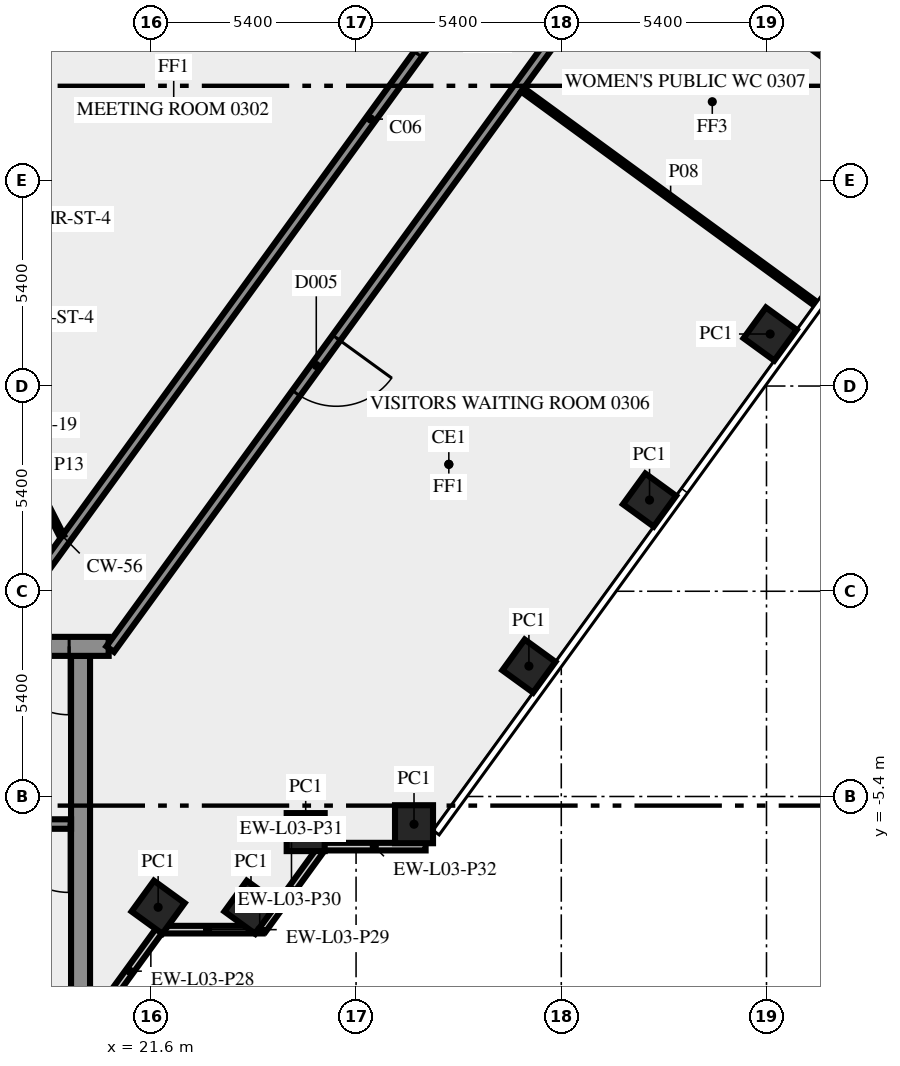
"""IFC4 building model, lengths in metres.
Left out: names, types, materials, properties, quantities, classifications, styles, units other than length and angle.
Written with IfcOpenShell. Run it as: python <this file> out.ifc"""

import sys

from ifc_helpers import new_model, si_unit, direction, frame, frame_2d, origin, origin_2d, place, context, subcontext, project, spatial, rectangle, extrude, element, fill, save


model = new_model("IFC4")
c1 = context("Model", 3, precision=1e-05, world=origin(), true_north=direction((0.0, 1.0)))
c2 = subcontext(c1, "Body", "Model", "MODEL_VIEW")
j1 = project(units=[si_unit("LENGTHUNIT", "METRE"), si_unit("PLANEANGLEUNIT", "RADIAN")], contexts=[c1])
p1 = place(None, origin())
s1 = spatial("IfcSite", under=j1, at=p1, CompositionType="ELEMENT")
p2 = place(p1, origin())
s2 = spatial("IfcBuilding", under=s1, at=p2, CompositionType="ELEMENT")
p3 = place(p2, frame((0.0, 0.0, 16.0)))
s3 = spatial("IfcBuildingStorey", under=s2, at=p3, CompositionType="ELEMENT", Elevation=16.0)
for number, where, z_axis, x_axis in (
    (1, (21.792, -8.315, 0.0), (0.0, 0.0, 1.0), (0.588, 0.809, 0.0)),
    (2, (24.235, -8.315, 0.0), (0.0, 0.0, 1.0), (0.588, 0.809, 0.0)),
    (3, (25.674, -6.337, 0.0), (0.0, 0.0, 1.0), (1.0, 0.0, 0.0)),
    (4, (28.525, -6.13, 0.0), (0.0, 0.0, 1.0), (1.0, 0.0, 0.0)),
    (5, (31.548, -1.969, 0.0), (0.0, 0.0, 1.0), (0.588, 0.809, 0.0)),
    (6, (34.722, 2.4, 0.0), (0.0, 0.0, 1.0), (0.588, 0.809, 0.0)),
    (7, (37.896, 6.769, 0.0), (0.0, 0.0, 1.0), (0.588, 0.809, 0.0)),
):
    element("IfcColumn", number, at=place(p3, frame(where, z_axis=z_axis, x_axis=x_axis)), inside=s3, PredefinedType="COLUMN", context=c2, shape_type="SweptSolid", body=[
        extrude(rectangle(XDim=1.0, YDim=1.0, at=origin_2d()), origin(), (0.0, 0.0, 1.0), 4.1),
    ])
p4 = place(p3, frame((20.253, -11.083, 0.0), z_axis=(0.0, 0.0, 1.0), x_axis=(0.587766567315, 0.809030569476, 0.0)))
e8 = element("IfcWall", 8, at=p4, inside=s3, PredefinedType="SOLIDWALL", context=c2, shape_type="SweptSolid", body=[
    extrude(rectangle(XDim=2.688, YDim=0.2, at=frame_2d((1.344, 0.0))), origin(), (0.0, 0.0, 1.0), 4.1),
])
p5 = place(p3, frame((21.943, -8.904, 0.0), z_axis=(0.0, 0.0, 1.0), x_axis=(1.0, 0.0, 0.0)))
e9 = element("IfcWall", 9, at=p5, inside=s3, PredefinedType="SOLIDWALL", context=c2, shape_type="SweptSolid", body=[
    extrude(rectangle(XDim=2.298, YDim=0.2, at=frame_2d((1.149, 0.0))), origin(), (0.0, 0.0, 1.0), 4.1),
])
p6 = place(p3, frame((24.387, -8.904, 0.0), z_axis=(0.0, 0.0, 1.0), x_axis=(1.0, 0.0, 0.0)))
e10 = element("IfcWall", 10, at=p6, inside=s3, PredefinedType="SOLIDWALL", context=c2, shape_type="SweptSolid", body=[
    extrude(rectangle(XDim=0.156, YDim=0.2, at=frame_2d((0.078, 0.0))), origin(), (0.0, 0.0, 1.0), 4.1),
])
p7 = place(p3, frame((24.54, -8.899, 0.0), z_axis=(0.0, 0.0, 1.0), x_axis=(0.587700286833, 0.809078718578, 0.0)))
e11 = element("IfcWall", 11, at=p7, inside=s3, PredefinedType="SOLIDWALL", context=c2, shape_type="SweptSolid", body=[
    extrude(rectangle(XDim=2.587, YDim=0.2, at=frame_2d((1.293, 0.0))), origin(), (0.0, 0.0, 1.0), 4.1),
])
p8 = place(p3, frame((26.13, -6.719, 0.0), z_axis=(0.0, 0.0, 1.0), x_axis=(1.0, 0.0, 0.0)))
e12 = element("IfcWall", 12, at=p8, inside=s3, PredefinedType="SOLIDWALL", context=c2, shape_type="SweptSolid", body=[
    extrude(rectangle(XDim=2.7, YDim=0.2, at=frame_2d((1.35, 0.0))), origin(), (0.0, 0.0, 1.0), 4.1),
])
p9 = place(p3, frame((19.75, -10.5, 0.0), z_axis=(0.0, 0.0, 1.0), x_axis=(0.0, 1.0, 0.0)))
e13 = element("IfcWall", 13, at=p9, inside=s3, PredefinedType="SHEAR", context=c2, shape_type="SweptSolid", body=[
    extrude(rectangle(XDim=8.8, YDim=0.5, at=frame_2d((4.4, 0.0))), origin(), (0.0, 0.0, 1.0), 4.1),
])
p10 = place(p3, frame((19.5, -6.125, 0.0), z_axis=(0.0, 0.0, 1.0), x_axis=(-1.0, 0.0, 0.0)))
e14 = element("IfcWall", 14, at=p10, inside=s3, PredefinedType="SHEAR", context=c2, shape_type="SweptSolid", body=[
    extrude(rectangle(XDim=8.05, YDim=0.25, at=frame_2d((4.025, 0.0))), origin(), (0.0, 0.0, 1.0), 4.1),
])
p11 = place(p10, frame((0.05, 0.0, 0.0)))
e15 = element("IfcOpeningElement", 15, at=p11, cuts=e14, PredefinedType="OPENING", context=c2, shape_type="SweptSolid", body=[
    extrude(rectangle(XDim=1.8, YDim=2.1, at=frame_2d((0.9, 1.05))), frame((0.0, 0.135, 0.0), z_axis=(0.0, -1.0, 0.0), x_axis=(1.0, 0.0, 0.0)), (0.0, 0.0, 1.0), 0.27),
])
p12 = place(p3, frame((20.49, -1.45, 0.0), z_axis=(0.0, 0.0, 1.0), x_axis=(-1.0, 0.0, 0.0)))
e16 = element("IfcWall", 16, at=p12, inside=s3, PredefinedType="SHEAR", context=c2, shape_type="SweptSolid", body=[
    extrude(rectangle(XDim=40.98, YDim=0.5, at=frame_2d((20.49, 0.0))), origin(), (0.0, 0.0, 1.0), 4.1),
])
p13 = place(p12, frame((38.14, 0.0, 0.0)))
e17 = element("IfcOpeningElement", 17, at=p13, cuts=e16, PredefinedType="OPENING", context=c2, shape_type="SweptSolid", body=[
    extrude(rectangle(XDim=1.8, YDim=2.1, at=frame_2d((0.9, 1.05))), frame((0.0, 0.26, 0.0), z_axis=(0.0, -1.0, 0.0), x_axis=(1.0, 0.0, 0.0)), (0.0, 0.0, 1.0), 0.52),
])
p14 = place(p12, frame((36.728, 0.0, 0.0)))
e18 = element("IfcOpeningElement", 18, at=p14, cuts=e16, PredefinedType="OPENING", context=c2, shape_type="SweptSolid", body=[
    extrude(rectangle(XDim=0.8, YDim=2.1, at=frame_2d((0.4, 1.05))), frame((0.0, 0.26, 0.0), z_axis=(0.0, -1.0, 0.0), x_axis=(1.0, 0.0, 0.0)), (0.0, 0.0, 1.0), 0.52),
])
p15 = place(p12, frame((35.153, 0.0, 0.0)))
e19 = element("IfcOpeningElement", 19, at=p15, cuts=e16, PredefinedType="OPENING", context=c2, shape_type="SweptSolid", body=[
    extrude(rectangle(XDim=0.8, YDim=2.1, at=frame_2d((0.4, 1.05))), frame((0.0, 0.26, 0.0), z_axis=(0.0, -1.0, 0.0), x_axis=(1.0, 0.0, 0.0)), (0.0, 0.0, 1.0), 0.52),
])
p16 = place(p12, frame((32.94, 0.0, 0.0)))
e20 = element("IfcOpeningElement", 20, at=p16, cuts=e16, PredefinedType="OPENING", context=c2, shape_type="SweptSolid", body=[
    extrude(rectangle(XDim=0.9, YDim=2.1, at=frame_2d((0.45, 1.05))), frame((0.0, 0.26, 0.0), z_axis=(0.0, -1.0, 0.0), x_axis=(1.0, 0.0, 0.0)), (0.0, 0.0, 1.0), 0.52),
])
p17 = place(p12, frame((21.765, 0.0, 0.0)))
e21 = element("IfcOpeningElement", 21, at=p17, cuts=e16, PredefinedType="OPENING", context=c2, shape_type="SweptSolid", body=[
    extrude(rectangle(XDim=2.0, YDim=2.1, at=frame_2d((1.0, 1.05))), frame((0.0, 0.26, 0.0), z_axis=(0.0, -1.0, 0.0), x_axis=(1.0, 0.0, 0.0)), (0.0, 0.0, 1.0), 0.52),
])
p18 = place(p12, frame((7.14, 0.0, 0.0)))
e22 = element("IfcOpeningElement", 22, at=p18, cuts=e16, PredefinedType="OPENING", context=c2, shape_type="SweptSolid", body=[
    extrude(rectangle(XDim=0.9, YDim=2.1, at=frame_2d((0.45, 1.05))), frame((0.0, 0.26, 0.0), z_axis=(0.0, -1.0, 0.0), x_axis=(1.0, 0.0, 0.0)), (0.0, 0.0, 1.0), 0.52),
])
p19 = place(p12, frame((4.19, 0.0, 0.0)))
e23 = element("IfcOpeningElement", 23, at=p19, cuts=e16, PredefinedType="OPENING", context=c2, shape_type="SweptSolid", body=[
    extrude(rectangle(XDim=0.9, YDim=2.1, at=frame_2d((0.45, 1.05))), frame((0.0, 0.26, 0.0), z_axis=(0.0, -1.0, 0.0), x_axis=(1.0, 0.0, 0.0)), (0.0, 0.0, 1.0), 0.52),
])
p20 = place(p12, frame((1.04, 0.0, 0.0)))
e24 = element("IfcOpeningElement", 24, at=p20, cuts=e16, PredefinedType="OPENING", context=c2, shape_type="SweptSolid", body=[
    extrude(rectangle(XDim=1.8, YDim=2.1, at=frame_2d((0.9, 1.05))), frame((0.0, 0.26, 0.0), z_axis=(0.0, -1.0, 0.0), x_axis=(1.0, 0.0, 0.0)), (0.0, 0.0, 1.0), 0.52),
])
p21 = place(p3, frame((49.869, 38.856, 0.0), z_axis=(0.0, 0.0, 1.0), x_axis=(-0.587784522481, -0.809017524614, 0.0)))
e25 = element("IfcWall", 25, at=p21, inside=s3, PredefinedType="SOLIDWALL", context=c2, shape_type="SweptSolid", body=[
    extrude(rectangle(XDim=49.912, YDim=0.25, at=frame_2d((24.956, 0.0))), origin(), (0.0, 0.0, 1.0), 4.1),
])
p22 = place(p21, frame((19.271, 0.0, 0.0)))
e26 = element("IfcOpeningElement", 26, at=p22, cuts=e25, PredefinedType="OPENING", context=c2, shape_type="SweptSolid", body=[
    extrude(rectangle(XDim=1.8, YDim=2.1, at=frame_2d((0.9, 1.05))), frame((0.0, 0.135, 0.0), z_axis=(0.0, -1.0, 0.0), x_axis=(1.0, 0.0, 0.0)), (0.0, 0.0, 1.0), 0.27),
])
p23 = place(p21, frame((26.596, 0.0, 0.0)))
e27 = element("IfcOpeningElement", 27, at=p23, cuts=e25, PredefinedType="OPENING", context=c2, shape_type="SweptSolid", body=[
    extrude(rectangle(XDim=0.9, YDim=2.1, at=frame_2d((0.45, 1.05))), frame((0.0, 0.135, 0.0), z_axis=(0.0, -1.0, 0.0), x_axis=(1.0, 0.0, 0.0)), (0.0, 0.0, 1.0), 0.27),
])
p24 = place(p21, frame((12.846, 0.0, 0.0)))
e28 = element("IfcOpeningElement", 28, at=p24, cuts=e25, PredefinedType="OPENING", context=c2, shape_type="SweptSolid", body=[
    extrude(rectangle(XDim=0.9, YDim=2.1, at=frame_2d((0.45, 1.05))), frame((0.0, 0.135, 0.0), z_axis=(0.0, -1.0, 0.0), x_axis=(1.0, 0.0, 0.0)), (0.0, 0.0, 1.0), 0.27),
])
p25 = place(p21, frame((39.788, 0.0, 0.0)))
e29 = element("IfcOpeningElement", 29, at=p25, cuts=e25, PredefinedType="OPENING", context=c2, shape_type="SweptSolid", body=[
    extrude(rectangle(XDim=1.8, YDim=2.1, at=frame_2d((0.9, 1.05))), frame((0.0, 0.135, 0.0), z_axis=(0.0, -1.0, 0.0), x_axis=(1.0, 0.0, 0.0)), (0.0, 0.0, 1.0), 0.27),
])
p26 = place(p3, frame((17.545, -1.125, 0.0), z_axis=(0.0, 0.0, 1.0), x_axis=(0.587786323093, 0.809016216391, 0.0)))
e30 = element("IfcWall", 30, at=p26, inside=s3, PredefinedType="SOLIDWALL", context=c2, shape_type="SweptSolid", body=[
    extrude(rectangle(XDim=33.493, YDim=0.25, at=frame_2d((16.747, 0.0))), origin(), (0.0, 0.0, 1.0), 4.1),
])
p27 = place(p26, frame((25.608, 0.0, 0.0)))
e31 = element("IfcOpeningElement", 31, at=p27, cuts=e30, PredefinedType="OPENING", context=c2, shape_type="SweptSolid", body=[
    extrude(rectangle(XDim=0.9, YDim=2.1, at=frame_2d((0.45, 1.05))), frame((0.0, 0.135, 0.0), z_axis=(0.0, -1.0, 0.0), x_axis=(1.0, 0.0, 0.0)), (0.0, 0.0, 1.0), 0.27),
])
p28 = place(p26, frame((18.858, 0.0, 0.0)))
e32 = element("IfcOpeningElement", 32, at=p28, cuts=e30, PredefinedType="OPENING", context=c2, shape_type="SweptSolid", body=[
    extrude(rectangle(XDim=0.9, YDim=2.1, at=frame_2d((0.45, 1.05))), frame((0.0, 0.135, 0.0), z_axis=(0.0, -1.0, 0.0), x_axis=(1.0, 0.0, 0.0)), (0.0, 0.0, 1.0), 0.27),
])
p29 = place(p26, frame((27.208, 0.0, 0.0)))
e33 = element("IfcOpeningElement", 33, at=p29, cuts=e30, PredefinedType="OPENING", context=c2, shape_type="SweptSolid", body=[
    extrude(rectangle(XDim=0.9, YDim=2.1, at=frame_2d((0.45, 1.05))), frame((0.0, 0.135, 0.0), z_axis=(0.0, -1.0, 0.0), x_axis=(1.0, 0.0, 0.0)), (0.0, 0.0, 1.0), 0.27),
])
p30 = place(p3, frame((34.554, 17.565, 0.0), z_axis=(0.0, 0.0, 1.0), x_axis=(0.807645841498, -0.589667868135, 0.0)))
e34 = element("IfcWall", 34, at=p30, inside=s3, PredefinedType="PARTITIONING", context=c2, shape_type="SweptSolid", body=[
    extrude(rectangle(XDim=9.551, YDim=0.12, at=frame_2d((4.775, 0.0))), origin(), (0.0, 0.0, 1.0), 3.1),
])
p31 = place(p3, frame((31.38, 13.196, 0.0), z_axis=(0.0, 0.0, 1.0), x_axis=(0.807701085448, -0.589592195137, 0.0)))
e35 = element("IfcWall", 35, at=p31, inside=s3, PredefinedType="PARTITIONING", context=c2, shape_type="SweptSolid", body=[
    extrude(rectangle(XDim=9.651, YDim=0.12, at=frame_2d((4.826, 0.0))), origin(), (0.0, 0.0, 1.0), 3.1),
])
p32 = place(p3, frame((18.0, 3.925, 0.0), z_axis=(0.0, 0.0, 1.0), x_axis=(0.453950796792, -0.891026752736, 0.0)))
e36 = element("IfcWall", 36, at=p32, inside=s3, PredefinedType="PARTITIONING", context=c2, shape_type="SweptSolid", body=[
    extrude(rectangle(XDim=2.778, YDim=0.12, at=frame_2d((1.389, 0.0))), origin(), (0.0, 0.0, 1.0), 4.1),
])
p33 = place(p11, origin())
e37 = element("IfcDoor", 37, at=p33, inside=s3, OperationType="DOUBLE_DOOR_SINGLE_SWING", PredefinedType="DOOR", context=c2, shape_type="SweptSolid", body=[
    extrude(rectangle(XDim=1.8, YDim=2.1, at=frame_2d((0.9, 1.05))), frame((0.0, 0.025, 0.0), z_axis=(0.0, -1.0, 0.0), x_axis=(1.0, 0.0, 0.0)), (0.0, 0.0, 1.0), 0.05),
])
fill(e15, e37)
p34 = place(p20, origin())
e38 = element("IfcDoor", 38, at=p34, inside=s3, OperationType="DOUBLE_DOOR_SINGLE_SWING", PredefinedType="DOOR", context=c2, shape_type="SweptSolid", body=[
    extrude(rectangle(XDim=1.8, YDim=2.1, at=frame_2d((0.9, 1.05))), frame((0.0, 0.025, 0.0), z_axis=(0.0, -1.0, 0.0), x_axis=(1.0, 0.0, 0.0)), (0.0, 0.0, 1.0), 0.05),
])
fill(e24, e38)
p35 = place(p28, origin())
e39 = element("IfcDoor", 39, at=p35, inside=s3, OperationType="SINGLE_SWING_RIGHT", PredefinedType="DOOR", context=c2, shape_type="SweptSolid", body=[
    extrude(rectangle(XDim=0.9, YDim=2.1, at=frame_2d((0.45, 1.05))), frame((0.0, 0.025, 0.0), z_axis=(0.0, -1.0, 0.0), x_axis=(1.0, 0.0, 0.0)), (0.0, 0.0, 1.0), 0.05),
])
fill(e32, e39)
p36 = place(p25, origin())
e40 = element("IfcDoor", 40, at=p36, inside=s3, OperationType="DOUBLE_DOOR_SINGLE_SWING", PredefinedType="DOOR", context=c2, shape_type="SweptSolid", body=[
    extrude(rectangle(XDim=1.8, YDim=2.1, at=frame_2d((0.9, 1.05))), frame((0.0, 0.025, 0.0), z_axis=(0.0, -1.0, 0.0), x_axis=(1.0, 0.0, 0.0)), (0.0, 0.0, 1.0), 0.05),
])
fill(e29, e40)
save(model, sys.argv[1])
